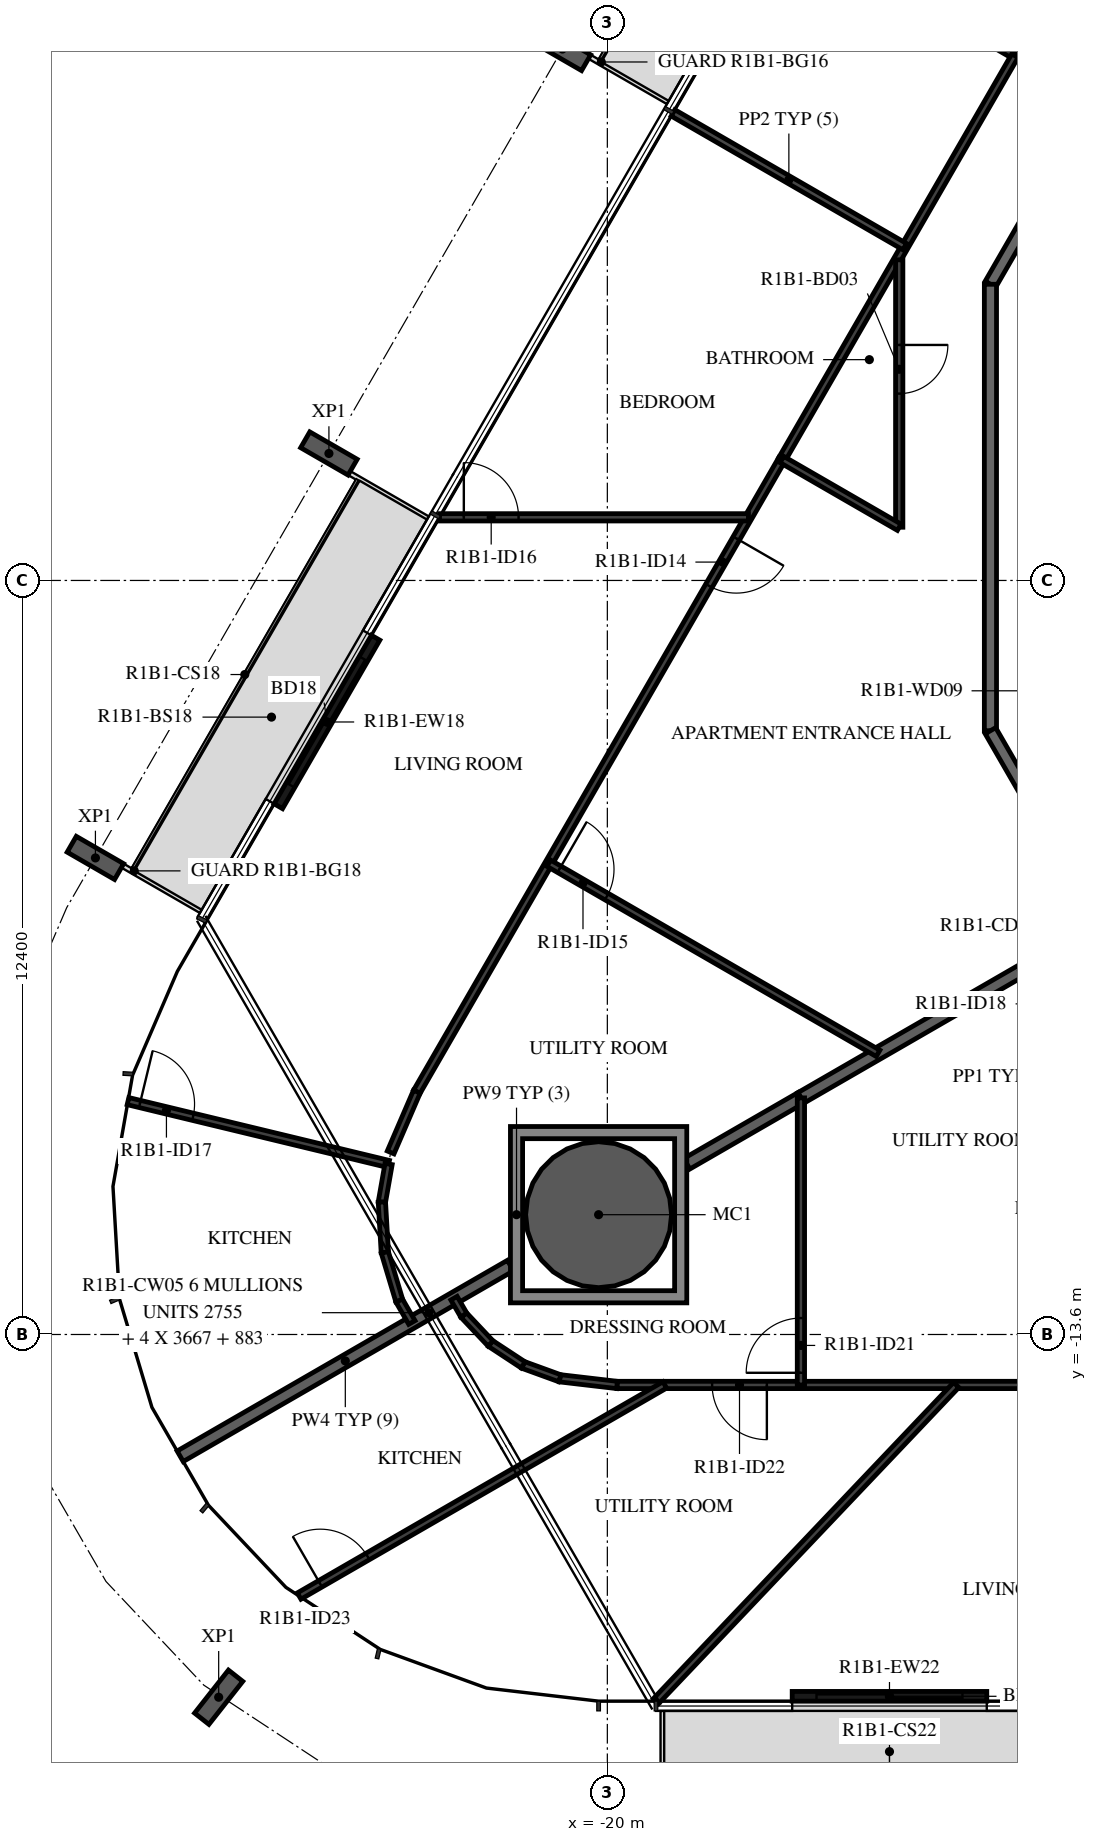
"""IFC4 building model, lengths in metres.
Left out: names, types, materials, properties, quantities, classifications, styles, units other than length and angle.
Written with IfcOpenShell. Run it as: python <this file> out.ifc"""

import sys

from ifc_helpers import new_model, si_unit, direction, frame, frame_2d, origin, origin_2d, place, context, subcontext, project, spatial, polyline, rectangle, hollow_circle, i_section, outline, extrude, element, fill, save


model = new_model("IFC4")
c1 = context("Model", 3, precision=1e-05, world=origin(), true_north=direction((0.0, 1.0)))
c2 = subcontext(c1, "Body", "Model", "MODEL_VIEW")
j1 = project(units=[si_unit("LENGTHUNIT", "METRE"), si_unit("PLANEANGLEUNIT", "RADIAN")], contexts=[c1])
p1 = place(None, origin())
s1 = spatial("IfcSite", under=j1, at=p1, CompositionType="ELEMENT")
p2 = place(p1, origin())
s2 = spatial("IfcBuilding", under=s1, at=p2, CompositionType="ELEMENT")
p3 = place(p2, frame((0.0, 0.0, 48.9)))
s3 = spatial("IfcBuildingStorey", under=s2, at=p3, CompositionType="ELEMENT", Elevation=48.9)
p4 = place(p3, frame((-20.144, -11.63, -0.38), z_axis=(0.0, 0.0, 1.0), x_axis=(1.0, 0.0, 0.0)))
e1 = element("IfcColumn", 1, at=p4, inside=s3, PredefinedType="COLUMN", context=c2, shape_type="SweptSolid", body=[
    extrude(hollow_circle(Radius=1.2, WallThickness=0.06, at=origin_2d()), origin(), (0.0, 0.0, 1.0), 3.5),
])
for number, where, z_axis, x_axis in (
    (2, (-20.739, 7.539, -0.38), (0.0, 0.0, 1.0), (0.5, 0.866, 0.0)),
    (3, (-24.579, 0.888, -0.38), (0.0, 0.0, 1.0), (0.5, 0.866, 0.0)),
    (4, (-28.419, -5.763, -0.38), (0.0, 0.0, 1.0), (0.5, 0.866, 0.0)),
    (5, (-26.392, -19.565, -0.38), (0.0, 0.0, 1.0), (-0.786, 0.619, 0.0)),
):
    element("IfcColumn", number, at=place(p3, frame(where, z_axis=z_axis, x_axis=x_axis)), inside=s3, PredefinedType="COLUMN", context=c2, shape_type="SweptSolid", body=[
        extrude(i_section(OverallWidth=0.3, OverallDepth=0.9, WebThickness=0.019, FlangeThickness=0.035, FilletRadius=0.03, at=origin_2d()), origin(), (0.0, 0.0, 1.0), 3.5),
    ])
p5 = place(p3, frame((-23.811, -2.142, 0.0), z_axis=(0.0, 0.0, 1.0), x_axis=(-0.500028443584, -0.866008981251, 0.0)))
e6 = element("IfcWall", 6, at=p5, inside=s3, PredefinedType="STANDARD", context=c2, shape_type="SweptSolid", body=[
    extrude(rectangle(XDim=3.2, YDim=0.16, at=frame_2d((1.6, 0.0))), origin(), (0.0, 0.0, 1.0), 3.12),
])
p6 = place(p5, frame((0.4, 0.0, 0.0)))
e7 = element("IfcOpeningElement", 7, at=p6, cuts=e6, PredefinedType="OPENING", context=c2, shape_type="SweptSolid", body=[
    extrude(rectangle(XDim=2.4, YDim=2.4, at=frame_2d((1.2, 1.2))), frame((0.0, 0.09, 0.0), z_axis=(0.0, -1.0, 0.0), x_axis=(1.0, 0.0, 0.0)), (0.0, 0.0, 1.0), 0.18),
])
p7 = place(p3, frame((-16.96, -19.55, 0.0), z_axis=(0.0, 0.0, 1.0), x_axis=(1.0, 0.0, 0.0)))
e8 = element("IfcWall", 8, at=p7, inside=s3, PredefinedType="STANDARD", context=c2, shape_type="SweptSolid", body=[
    extrude(rectangle(XDim=3.2, YDim=0.16, at=frame_2d((1.6, 0.0))), origin(), (0.0, 0.0, 1.0), 3.12),
])
p8 = place(p7, frame((0.4, 0.0, 0.0)))
e9 = element("IfcOpeningElement", 9, at=p8, cuts=e8, PredefinedType="OPENING", context=c2, shape_type="SweptSolid", body=[
    extrude(rectangle(XDim=2.4, YDim=2.4, at=frame_2d((1.2, 1.2))), frame((0.0, 0.09, 0.0), z_axis=(0.0, -1.0, 0.0), x_axis=(1.0, 0.0, 0.0)), (0.0, 0.0, 1.0), 0.18),
])
p9 = place(p3, frame((-10.029, 10.029, 0.0), z_axis=(0.0, 0.0, 1.0), x_axis=(-0.500001669485, -0.866024439905, 0.0)))
e10 = element("IfcWall", 10, at=p9, inside=s3, PredefinedType="STANDARD", context=c2, shape_type="SweptSolid", body=[
    extrude(rectangle(XDim=7.342, YDim=0.2, at=frame_2d((3.671, 0.0))), origin(), (0.0, 0.0, 1.0), 3.12),
])
p10 = place(p9, frame((0.2, 0.0, 0.0)))
e11 = element("IfcOpeningElement", 11, at=p10, cuts=e10, PredefinedType="OPENING", context=c2, shape_type="SweptSolid", body=[
    extrude(rectangle(XDim=1.0, YDim=2.1, at=frame_2d((0.5, 1.05))), frame((0.0, 0.11, 0.0), z_axis=(0.0, -1.0, 0.0), x_axis=(1.0, 0.0, 0.0)), (0.0, 0.0, 1.0), 0.22),
])
for number, where, z_axis, x_axis in (
    (12, (-13.7, 3.671, 0.0), (0.0, 0.0, 1.0), (0.0, -1.0, 0.0)),
    (13, (-13.7, -3.671, 0.0), (0.0, 0.0, 1.0), (0.5, -0.866, 0.0)),
):
    element("IfcWall", number, at=place(p3, frame(where, z_axis=z_axis, x_axis=x_axis)), inside=s3, PredefinedType="STANDARD", context=c2, shape_type="SweptSolid", body=[
        extrude(rectangle(XDim=7.342, YDim=0.2, at=frame_2d((3.671, 0.0))), origin(), (0.0, 0.0, 1.0), 3.12),
    ])
p11 = place(p3, frame((-16.817, -9.709, 0.0), z_axis=(0.0, 0.0, 1.0), x_axis=(0.86604338933, 0.499968846828, 0.0)))
e14 = element("IfcWall", 14, at=p11, inside=s3, PredefinedType="STANDARD", context=c2, shape_type="SweptSolid", body=[
    extrude(rectangle(XDim=5.718, YDim=0.2, at=frame_2d((2.859, 0.0))), origin(), (0.0, 0.0, 1.0), 3.12),
])
p12 = place(p3, frame((-27.025, -15.603, 0.0), z_axis=(0.0, 0.0, 1.0), x_axis=(0.866030653443, 0.499990907215, 0.0)))
e15 = element("IfcWall", 15, at=p12, inside=s3, PredefinedType="STANDARD", context=c2, shape_type="SweptSolid", body=[
    extrude(rectangle(XDim=6.271, YDim=0.2, at=frame_2d((3.136, 0.0))), origin(), (0.0, 0.0, 1.0), 3.12),
])
p13 = place(p3, frame((-18.694, -10.793, 0.0), z_axis=(0.0, 0.0, 1.0), x_axis=(0.866009251978, 0.500027974705, 0.0)))
e16 = element("IfcWall", 16, at=p13, inside=s3, PredefinedType="STANDARD", context=c2, shape_type="SweptSolid", body=[
    extrude(rectangle(XDim=2.167, YDim=0.2, at=frame_2d((1.084, 0.0))), origin(), (0.0, 0.0, 1.0), 3.12),
])
p14 = place(p3, frame((-15.106, 8.474, 0.0), z_axis=(0.0, 0.0, 1.0), x_axis=(0.866041603473, -0.499971940267, 0.0)))
e17 = element("IfcWall", 17, at=p14, inside=s3, PredefinedType="PARTITIONING", context=c2, shape_type="SweptSolid", body=[
    extrude(rectangle(XDim=2.089, YDim=0.12, at=frame_2d((1.045, 0.0))), origin(), (0.0, 0.0, 1.0), 3.12),
])
p15 = place(p3, frame((-13.297, 7.429, 0.0), z_axis=(0.0, 0.0, 1.0), x_axis=(-0.49999903102, -0.866025963225, 0.0)))
e18 = element("IfcWall", 18, at=p15, inside=s3, PredefinedType="PARTITIONING", context=c2, shape_type="SweptSolid", body=[
    extrude(rectangle(XDim=7.667, YDim=0.12, at=frame_2d((3.833, 0.0))), origin(), (0.0, 0.0, 1.0), 3.12),
])
p16 = place(p3, frame((-17.13, 0.79, 0.0), z_axis=(0.0, 0.0, 1.0), x_axis=(-0.499997052475, -0.866027105532, 0.0)))
e19 = element("IfcWall", 19, at=p16, inside=s3, PredefinedType="PARTITIONING", context=c2, shape_type="SweptSolid", body=[
    extrude(rectangle(XDim=12.006, YDim=0.12, at=frame_2d((6.003, 0.0))), origin(), (0.0, 0.0, 1.0), 3.12),
])
p17 = place(p16, frame((1.498, 0.0, 0.0)))
e20 = element("IfcOpeningElement", 20, at=p17, cuts=e19, PredefinedType="OPENING", context=c2, shape_type="SweptSolid", body=[
    extrude(rectangle(XDim=0.9, YDim=2.1, at=frame_2d((0.45, 1.05))), frame((0.0, 0.07, 0.0), z_axis=(0.0, -1.0, 0.0), x_axis=(1.0, 0.0, 0.0)), (0.0, 0.0, 1.0), 0.14),
])
p18 = place(p3, frame((-15.2, 4.073, 0.0), z_axis=(0.0, 0.0, 1.0), x_axis=(0.0, -1.0, 0.0)))
e21 = element("IfcWall", 21, at=p18, inside=s3, PredefinedType="PARTITIONING", context=c2, shape_type="SweptSolid", body=[
    extrude(rectangle(XDim=4.398, YDim=0.12, at=frame_2d((2.199, 0.0))), origin(), (0.0, 0.0, 1.0), 3.12),
])
p19 = place(p18, frame((1.4, 0.0, 0.0)))
e22 = element("IfcOpeningElement", 22, at=p19, cuts=e21, PredefinedType="OPENING", context=c2, shape_type="SweptSolid", body=[
    extrude(rectangle(XDim=0.8, YDim=2.1, at=frame_2d((0.4, 1.05))), frame((0.0, 0.07, 0.0), z_axis=(0.0, -1.0, 0.0), x_axis=(1.0, 0.0, 0.0)), (0.0, 0.0, 1.0), 0.14),
])
p20 = place(p3, frame((-15.2, -0.325, 0.0), z_axis=(0.0, 0.0, 1.0), x_axis=(-0.866003168561, 0.500038510559, 0.0)))
e23 = element("IfcWall", 23, at=p20, inside=s3, PredefinedType="PARTITIONING", context=c2, shape_type="SweptSolid", body=[
    extrude(rectangle(XDim=2.229, YDim=0.12, at=frame_2d((1.114, 0.0))), origin(), (0.0, 0.0, 1.0), 3.12),
])
p21 = place(p3, frame((-20.963, -5.85, 0.0), z_axis=(0.0, 0.0, 1.0), x_axis=(0.866021746608, -0.500006334362, 0.0)))
e24 = element("IfcWall", 24, at=p21, inside=s3, PredefinedType="PARTITIONING", context=c2, shape_type="SweptSolid", body=[
    extrude(rectangle(XDim=6.253, YDim=0.12, at=frame_2d((3.127, 0.0))), origin(), (0.0, 0.0, 1.0), 3.12),
])
p22 = place(p21, frame((0.2, 0.0, 0.0)))
e25 = element("IfcOpeningElement", 25, at=p22, cuts=e24, PredefinedType="OPENING", context=c2, shape_type="SweptSolid", body=[
    extrude(rectangle(XDim=0.9, YDim=2.1, at=frame_2d((0.45, 1.05))), frame((0.0, 0.07, 0.0), z_axis=(0.0, -1.0, 0.0), x_axis=(1.0, 0.0, 0.0)), (0.0, 0.0, 1.0), 0.14),
])
p23 = place(p3, frame((-18.92, 6.49, 0.0), z_axis=(0.0, 0.0, 1.0), x_axis=(0.865994303029, -0.500053864221, 0.0)))
e26 = element("IfcWall", 26, at=p23, inside=s3, PredefinedType="PARTITIONING", context=c2, shape_type="SweptSolid", body=[
    extrude(rectangle(XDim=4.4, YDim=0.12, at=frame_2d((2.2, 0.0))), origin(), (0.0, 0.0, 1.0), 2.73),
])
p24 = place(p3, frame((-22.76, -0.162, 0.0), z_axis=(0.0, 0.0, 1.0), x_axis=(1.0, 0.0, 0.0)))
e27 = element("IfcWall", 27, at=p24, inside=s3, PredefinedType="PARTITIONING", context=c2, shape_type="SweptSolid", body=[
    extrude(rectangle(XDim=5.081, YDim=0.12, at=frame_2d((2.54, 0.0))), origin(), (0.0, 0.0, 1.0), 3.12),
])
p25 = place(p24, frame((0.4, 0.0, 0.0)))
e28 = element("IfcOpeningElement", 28, at=p25, cuts=e27, PredefinedType="OPENING", context=c2, shape_type="SweptSolid", body=[
    extrude(rectangle(XDim=0.9, YDim=2.1, at=frame_2d((0.45, 1.05))), frame((0.0, 0.07, 0.0), z_axis=(0.0, -1.0, 0.0), x_axis=(1.0, 0.0, 0.0)), (0.0, 0.0, 1.0), 0.14),
])
p26 = place(p3, frame((-23.564, -10.606, 0.0), z_axis=(0.0, 0.0, 1.0), x_axis=(0.396195073027, 0.918166359713, 0.0)))
e29 = element("IfcWall", 29, at=p26, inside=s3, PredefinedType="PARTITIONING", context=c2, shape_type="SweptSolid", body=[
    extrude(rectangle(XDim=1.087, YDim=0.12, at=frame_2d((0.543, 0.0))), origin(), (0.0, 0.0, 1.0), 3.12),
])
p27 = place(p3, frame((-27.883, -9.762, 0.0), z_axis=(0.0, 0.0, 1.0), x_axis=(0.972097015458, -0.234579181809, 0.0)))
e30 = element("IfcWall", 30, at=p27, inside=s3, PredefinedType="PARTITIONING", context=c2, shape_type="SweptSolid", body=[
    extrude(rectangle(XDim=4.409, YDim=0.12, at=frame_2d((2.204, 0.0))), origin(), (0.0, 0.0, 1.0), 3.12),
])
p28 = place(p27, frame((0.2, 0.0, 0.0)))
e31 = element("IfcOpeningElement", 31, at=p28, cuts=e30, PredefinedType="OPENING", context=c2, shape_type="SweptSolid", body=[
    extrude(rectangle(XDim=0.9, YDim=2.1, at=frame_2d((0.45, 1.05))), frame((0.0, 0.07, 0.0), z_axis=(0.0, -1.0, 0.0), x_axis=(1.0, 0.0, 0.0)), (0.0, 0.0, 1.0), 0.14),
])
p29 = place(p3, frame((-23.597, -10.796, 0.0), z_axis=(0.0, 0.0, 1.0), x_axis=(-0.173610040386, -0.984814476882, 0.0)))
e32 = element("IfcWall", 32, at=p29, inside=s3, PredefinedType="PARTITIONING", context=c2, shape_type="SweptSolid", body=[
    extrude(rectangle(XDim=0.636, YDim=0.12, at=frame_2d((0.318, 0.0))), origin(), (0.0, 0.0, 1.0), 3.12),
])
p30 = place(p3, frame((-23.708, -11.422, 0.0), z_axis=(0.0, 0.0, 1.0), x_axis=(0.058031280246, -0.998314765248, 0.0)))
e33 = element("IfcWall", 33, at=p30, inside=s3, PredefinedType="PARTITIONING", context=c2, shape_type="SweptSolid", body=[
    extrude(rectangle(XDim=0.829, YDim=0.12, at=frame_2d((0.415, 0.0))), origin(), (0.0, 0.0, 1.0), 3.12),
])
p31 = place(p3, frame((-23.659, -12.25, 0.0), z_axis=(0.0, 0.0, 1.0), x_axis=(0.286834510868, -0.957980147694, 0.0)))
e34 = element("IfcWall", 34, at=p31, inside=s3, PredefinedType="PARTITIONING", context=c2, shape_type="SweptSolid", body=[
    extrude(rectangle(XDim=0.829, YDim=0.12, at=frame_2d((0.415, 0.0))), origin(), (0.0, 0.0, 1.0), 3.12),
])
p32 = place(p3, frame((-23.422, -13.044, 0.0), z_axis=(0.0, 0.0, 1.0), x_axis=(0.50013037474, -0.865950118807, 0.0)))
e35 = element("IfcWall", 35, at=p32, inside=s3, PredefinedType="PARTITIONING", context=c2, shape_type="SweptSolid", body=[
    extrude(rectangle(XDim=0.415, YDim=0.12, at=frame_2d((0.207, 0.0))), origin(), (0.0, 0.0, 1.0), 3.12),
])
p33 = place(p3, frame((-5.407, -14.43, 0.0), z_axis=(0.0, 0.0, 1.0), x_axis=(-1.0, 0.0, 0.0)))
e36 = element("IfcWall", 36, at=p33, inside=s3, PredefinedType="PARTITIONING", context=c2, shape_type="SweptSolid", body=[
    extrude(rectangle(XDim=14.434, YDim=0.12, at=frame_2d((7.217, 0.0))), origin(), (0.0, 0.0, 1.0), 3.12),
])
p34 = place(p33, frame((11.97, 0.0, 0.0)))
e37 = element("IfcOpeningElement", 37, at=p34, cuts=e36, PredefinedType="OPENING", context=c2, shape_type="SweptSolid", body=[
    extrude(rectangle(XDim=0.9, YDim=2.1, at=frame_2d((0.45, 1.05))), frame((0.0, 0.07, 0.0), z_axis=(0.0, -1.0, 0.0), x_axis=(1.0, 0.0, 0.0)), (0.0, 0.0, 1.0), 0.14),
])
p35 = place(p3, frame((-19.841, -14.43, 0.0), z_axis=(0.0, 0.0, 1.0), x_axis=(-0.993245320107, 0.116033331788, 0.0)))
e38 = element("IfcWall", 38, at=p35, inside=s3, PredefinedType="PARTITIONING", context=c2, shape_type="SweptSolid", body=[
    extrude(rectangle(XDim=0.947, YDim=0.12, at=frame_2d((0.473, 0.0))), origin(), (0.0, 0.0, 1.0), 3.12),
])
for number, where, z_axis, x_axis in (
    (39, (-20.781, -14.32, 0.0), (0.0, 0.0, 1.0), (-0.94, 0.342, 0.0)),
    (40, (-21.385, -14.101, 0.0), (0.0, 0.0, 1.0), (-0.835, 0.55, 0.0)),
    (41, (-21.921, -13.748, 0.0), (0.0, 0.0, 1.0), (-0.686, 0.727, 0.0)),
):
    element("IfcWall", number, at=place(p3, frame(where, z_axis=z_axis, x_axis=x_axis)), inside=s3, PredefinedType="PARTITIONING", context=c2, shape_type="SweptSolid", body=[
        extrude(rectangle(XDim=0.642, YDim=0.12, at=frame_2d((0.321, 0.0))), origin(), (0.0, 0.0, 1.0), 3.12),
    ])
p36 = place(p3, frame((-22.361, -13.281, 0.0), z_axis=(0.0, 0.0, 1.0), x_axis=(-0.499656614129, 0.86622356696, 0.0)))
e42 = element("IfcWall", 42, at=p36, inside=s3, PredefinedType="PARTITIONING", context=c2, shape_type="SweptSolid", body=[
    extrude(rectangle(XDim=0.321, YDim=0.12, at=frame_2d((0.161, 0.0))), origin(), (0.0, 0.0, 1.0), 3.12),
])
p37 = place(p3, frame((-25.068, -17.901, 0.0), z_axis=(0.0, 0.0, 1.0), x_axis=(0.866025136247, 0.500000463387, 0.0)))
e43 = element("IfcWall", 43, at=p37, inside=s3, PredefinedType="PARTITIONING", context=c2, shape_type="SweptSolid", body=[
    extrude(rectangle(XDim=6.943, YDim=0.12, at=frame_2d((3.471, 0.0))), origin(), (0.0, 0.0, 1.0), 3.12),
])
p38 = place(p37, frame((0.4, 0.0, 0.0)))
e44 = element("IfcOpeningElement", 44, at=p38, cuts=e43, PredefinedType="OPENING", context=c2, shape_type="SweptSolid", body=[
    extrude(rectangle(XDim=0.9, YDim=2.1, at=frame_2d((0.45, 1.05))), frame((0.0, 0.07, 0.0), z_axis=(0.0, -1.0, 0.0), x_axis=(1.0, 0.0, 0.0)), (0.0, 0.0, 1.0), 0.14),
])
p39 = place(p3, frame((-16.817, -14.43, 0.0), z_axis=(0.0, 0.0, 1.0), x_axis=(0.0, 1.0, 0.0)))
e45 = element("IfcWall", 45, at=p39, inside=s3, PredefinedType="PARTITIONING", context=c2, shape_type="SweptSolid", body=[
    extrude(rectangle(XDim=4.721, YDim=0.12, at=frame_2d((2.36, 0.0))), origin(), (0.0, 0.0, 1.0), 3.12),
])
p40 = place(p39, frame((0.2, 0.0, 0.0)))
e46 = element("IfcOpeningElement", 46, at=p40, cuts=e45, PredefinedType="OPENING", context=c2, shape_type="SweptSolid", body=[
    extrude(rectangle(XDim=0.9, YDim=2.1, at=frame_2d((0.45, 1.05))), frame((0.0, 0.07, 0.0), z_axis=(0.0, -1.0, 0.0), x_axis=(1.0, 0.0, 0.0)), (0.0, 0.0, 1.0), 0.14),
])
p41 = place(p3, frame((-19.2, -19.63, 0.0), z_axis=(0.0, 0.0, 1.0), x_axis=(0.688551680792, 0.72518727435, 0.0)))
e47 = element("IfcWall", 47, at=p41, inside=s3, PredefinedType="PARTITIONING", context=c2, shape_type="SweptSolid", body=[
    extrude(rectangle(XDim=7.17, YDim=0.12, at=frame_2d((3.585, 0.0))), origin(), (0.0, 0.0, 1.0), 3.12),
])
p42 = place(p3, origin())
e48 = element("IfcWall", 48, at=p42, inside=s3, PredefinedType="STANDARD", context=c2, shape_type="SweptSolid", body=[
    extrude(outline(polyline([(-18.694, -10.18), (-18.694, -13.08), (-21.594, -13.08), (-21.594, -10.18), (-18.694, -10.18)]), holes=[polyline([(-21.394, -12.88), (-18.894, -12.88), (-18.894, -10.38), (-21.394, -10.38), (-21.394, -12.88)])]), origin(), (0.0, 0.0, 1.0), 3.12),
])
p43 = place(p6, origin())
e49 = element("IfcDoor", 49, at=p43, inside=s3, OperationType="DOUBLE_DOOR_SLIDING", PredefinedType="DOOR", context=c2, shape_type="SweptSolid", body=[
    extrude(rectangle(XDim=2.4, YDim=2.4, at=frame_2d((1.2, 1.2))), frame((0.0, 0.025, 0.0), z_axis=(0.0, -1.0, 0.0), x_axis=(1.0, 0.0, 0.0)), (0.0, 0.0, 1.0), 0.05),
])
fill(e7, e49)
p44 = place(p8, origin())
e50 = element("IfcDoor", 50, at=p44, inside=s3, OperationType="DOUBLE_DOOR_SLIDING", PredefinedType="DOOR", context=c2, shape_type="SweptSolid", body=[
    extrude(rectangle(XDim=2.4, YDim=2.4, at=frame_2d((1.2, 1.2))), frame((0.0, 0.025, 0.0), z_axis=(0.0, -1.0, 0.0), x_axis=(1.0, 0.0, 0.0)), (0.0, 0.0, 1.0), 0.05),
])
fill(e9, e50)
p45 = place(p19, origin())
e51 = element("IfcDoor", 51, at=p45, inside=s3, OperationType="SINGLE_SWING_RIGHT", PredefinedType="DOOR", context=c2, shape_type="SweptSolid", body=[
    extrude(rectangle(XDim=0.8, YDim=2.1, at=frame_2d((0.4, 1.05))), frame((0.0, 0.025, 0.0), z_axis=(0.0, -1.0, 0.0), x_axis=(1.0, 0.0, 0.0)), (0.0, 0.0, 1.0), 0.05),
])
fill(e22, e51)
p46 = place(p17, origin())
e52 = element("IfcDoor", 52, at=p46, inside=s3, OperationType="SINGLE_SWING_RIGHT", PredefinedType="DOOR", context=c2, shape_type="SweptSolid", body=[
    extrude(rectangle(XDim=0.9, YDim=2.1, at=frame_2d((0.45, 1.05))), frame((0.0, 0.025, 0.0), z_axis=(0.0, -1.0, 0.0), x_axis=(1.0, 0.0, 0.0)), (0.0, 0.0, 1.0), 0.05),
])
fill(e20, e52)
p47 = place(p22, origin())
e53 = element("IfcDoor", 53, at=p47, inside=s3, OperationType="SINGLE_SWING_RIGHT", PredefinedType="DOOR", context=c2, shape_type="SweptSolid", body=[
    extrude(rectangle(XDim=0.9, YDim=2.1, at=frame_2d((0.45, 1.05))), frame((0.0, 0.025, 0.0), z_axis=(0.0, -1.0, 0.0), x_axis=(1.0, 0.0, 0.0)), (0.0, 0.0, 1.0), 0.05),
])
fill(e25, e53)
p48 = place(p25, origin())
e54 = element("IfcDoor", 54, at=p48, inside=s3, OperationType="SINGLE_SWING_LEFT", PredefinedType="DOOR", context=c2, shape_type="SweptSolid", body=[
    extrude(rectangle(XDim=0.9, YDim=2.1, at=frame_2d((0.45, 1.05))), frame((0.0, 0.025, 0.0), z_axis=(0.0, -1.0, 0.0), x_axis=(1.0, 0.0, 0.0)), (0.0, 0.0, 1.0), 0.05),
])
fill(e28, e54)
p49 = place(p28, origin())
e55 = element("IfcDoor", 55, at=p49, inside=s3, OperationType="SINGLE_SWING_RIGHT", PredefinedType="DOOR", context=c2, shape_type="SweptSolid", body=[
    extrude(rectangle(XDim=0.9, YDim=2.1, at=frame_2d((0.45, 1.05))), frame((0.0, 0.025, 0.0), z_axis=(0.0, -1.0, 0.0), x_axis=(1.0, 0.0, 0.0)), (0.0, 0.0, 1.0), 0.05),
])
fill(e31, e55)
p50 = place(p40, origin())
e56 = element("IfcDoor", 56, at=p50, inside=s3, OperationType="SINGLE_SWING_LEFT", PredefinedType="DOOR", context=c2, shape_type="SweptSolid", body=[
    extrude(rectangle(XDim=0.9, YDim=2.1, at=frame_2d((0.45, 1.05))), frame((0.0, 0.025, 0.0), z_axis=(0.0, -1.0, 0.0), x_axis=(1.0, 0.0, 0.0)), (0.0, 0.0, 1.0), 0.05),
])
fill(e46, e56)
p51 = place(p34, origin())
e57 = element("IfcDoor", 57, at=p51, inside=s3, OperationType="SINGLE_SWING_LEFT", PredefinedType="DOOR", context=c2, shape_type="SweptSolid", body=[
    extrude(rectangle(XDim=0.9, YDim=2.1, at=frame_2d((0.45, 1.05))), frame((0.0, 0.025, 0.0), z_axis=(0.0, -1.0, 0.0), x_axis=(1.0, 0.0, 0.0)), (0.0, 0.0, 1.0), 0.05),
])
fill(e37, e57)
p52 = place(p38, origin())
e58 = element("IfcDoor", 58, at=p52, inside=s3, OperationType="SINGLE_SWING_LEFT", PredefinedType="DOOR", context=c2, shape_type="SweptSolid", body=[
    extrude(rectangle(XDim=0.9, YDim=2.1, at=frame_2d((0.45, 1.05))), frame((0.0, 0.025, 0.0), z_axis=(0.0, -1.0, 0.0), x_axis=(1.0, 0.0, 0.0)), (0.0, 0.0, 1.0), 0.05),
])
fill(e44, e58)
save(model, sys.argv[1])
